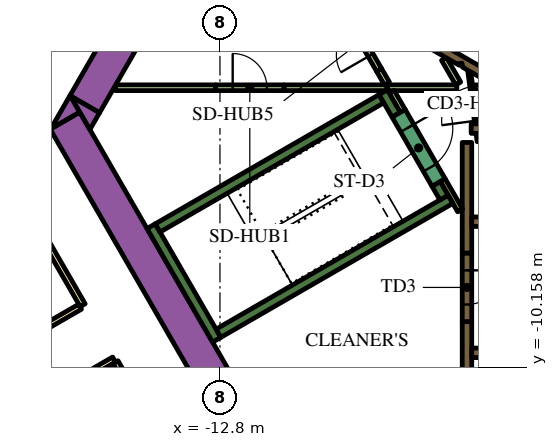
"""IFC4 building model, lengths in metres.
Left out: names, types, materials, properties, quantities, classifications, styles, units other than length and angle.
Written with IfcOpenShell. Run it as: python <this file> out.ifc"""

import sys

from ifc_helpers import new_model, si_unit, direction, frame, frame_2d, origin, place, context, subcontext, project, spatial, polyline, rectangle, outline, extrude, element, fill, save


model = new_model("IFC4")
c1 = context("Model", 3, precision=1e-05, world=origin(), true_north=direction((0.0, 1.0)))
c2 = subcontext(c1, "Body", "Model", "MODEL_VIEW")
j1 = project(units=[si_unit("LENGTHUNIT", "METRE"), si_unit("PLANEANGLEUNIT", "RADIAN")], contexts=[c1])
p1 = place(None, origin())
s1 = spatial("IfcSite", under=j1, at=p1, CompositionType="ELEMENT")
p2 = place(p1, origin())
s2 = spatial("IfcBuilding", under=s1, at=p2, CompositionType="ELEMENT")
p3 = place(p2, frame((0.0, 0.0, 62.7)))
s3 = spatial("IfcBuildingStorey", under=s2, at=p3, CompositionType="ELEMENT", Elevation=62.7)
p4 = place(p3, frame((-12.134, -11.883, 0.0), z_axis=(0.0, 0.0, 1.0), x_axis=(-0.500005339912, 0.866022320763, 0.0)))
e1 = element("IfcWall", 1, at=p4, inside=s3, PredefinedType="SOLIDWALL", context=c2, shape_type="SweptSolid", body=[
    extrude(rectangle(XDim=9.488, YDim=0.9, at=frame_2d((4.744, 0.0))), origin(), (0.0, 0.0, 1.0), 3.9),
])
p5 = place(p3, origin())
e2 = element("IfcWall", 2, at=p5, inside=s3, PredefinedType="SOLIDWALL", context=c2, shape_type="SweptSolid", body=[
    extrude(outline(polyline([(-16.489, -3.44), (-17.251, -3.88), (-16.743, -3.0), (-16.489, -3.44)])), origin(), (0.0, 0.0, 1.0), 3.9),
])
p6 = place(p3, frame((-15.118, -1.085, 0.0), z_axis=(0.0, 0.0, 1.0), x_axis=(-0.50006606081, -0.865987260198, 0.0)))
e3 = element("IfcWall", 3, at=p6, inside=s3, PredefinedType="SOLIDWALL", context=c2, shape_type="SweptSolid", body=[
    extrude(rectangle(XDim=2.481, YDim=0.9, at=frame_2d((1.24, 0.0))), origin(), (0.0, 0.0, 1.0), 3.9),
])
e4 = element("IfcWall", 4, at=p5, inside=s3, PredefinedType="SOLIDWALL", context=c2, shape_type="SweptSolid", body=[
    extrude(outline(polyline([(-16.223, -3.9), (-16.732, -3.02), (-15.969, -3.46), (-16.223, -3.9)])), origin(), (0.0, 0.0, 1.0), 3.9),
])
p7 = place(p3, frame((-12.885, -9.431, 0.0), z_axis=(0.0, 0.0, 1.0), x_axis=(-0.500020560727, 0.866013532718, 0.0)))
e5 = element("IfcWall", 5, at=p7, inside=s3, PredefinedType="SOLIDWALL", context=c2, shape_type="SweptSolid", body=[
    extrude(rectangle(XDim=3.45, YDim=0.25, at=frame_2d((1.725, 0.0))), origin(), (0.0, 0.0, 1.0), 3.9),
])
p8 = place(p3, frame((-14.44, -6.49, 0.0), z_axis=(0.0, 0.0, 1.0), x_axis=(0.866022966069, 0.500004222222, 0.0)))
e6 = element("IfcWall", 6, at=p8, inside=s3, PredefinedType="SOLIDWALL", context=c2, shape_type="SweptSolid", body=[
    extrude(rectangle(XDim=6.8, YDim=0.25, at=frame_2d((3.4, 0.0))), origin(), (0.0, 0.0, 1.0), 3.9),
])
p9 = place(p3, frame((-8.163, -3.511, 0.0), z_axis=(0.0, 0.0, 1.0), x_axis=(-0.500206266495, 0.865906283012, 0.0)))
e7 = element("IfcWall", 7, at=p9, inside=s3, PredefinedType="SOLIDWALL", context=c2, shape_type="SweptSolid", body=[
    extrude(rectangle(XDim=0.684, YDim=0.25, at=frame_2d((0.342, 0.0))), origin(), (0.0, 0.0, 1.0), 3.9),
])
p10 = place(p3, frame((-12.84, -9.261, 0.0), z_axis=(0.0, 0.0, 1.0), x_axis=(0.866016039709, 0.500016218704, 0.0)))
e8 = element("IfcWall", 8, at=p10, inside=s3, PredefinedType="SOLIDWALL", context=c2, shape_type="SweptSolid", body=[
    extrude(rectangle(XDim=7.05, YDim=0.25, at=frame_2d((3.525, 0.0))), origin(), (0.0, 0.0, 1.0), 3.9),
])
p11 = place(p3, frame((-6.905, -5.69, 0.0), z_axis=(0.0, 0.0, 1.0), x_axis=(-0.499993700073, 0.866029041019, 0.0)))
e9 = element("IfcWall", 9, at=p11, inside=s3, PredefinedType="SOLIDWALL", context=c2, shape_type="SweptSolid", body=[
    extrude(rectangle(XDim=0.416, YDim=0.25, at=frame_2d((0.208, 0.0))), origin(), (0.0, 0.0, 1.0), 3.9),
])
p12 = place(p3, frame((-6.3, -12.1, 0.0), z_axis=(0.0, 0.0, 1.0), x_axis=(0.0, 1.0, 0.0)))
e10 = element("IfcWall", 10, at=p12, inside=s3, PredefinedType="SOLIDWALL", context=c2, shape_type="SweptSolid", body=[
    extrude(rectangle(XDim=3.146, YDim=0.25, at=frame_2d((1.573, 0.0))), origin(), (0.0, 0.0, 1.0), 3.9),
])
p13 = place(p3, frame((-6.3, -4.24, 0.0), z_axis=(0.0, 0.0, 1.0), x_axis=(0.0, -1.0, 0.0)))
e11 = element("IfcWall", 11, at=p13, inside=s3, PredefinedType="SOLIDWALL", context=c2, shape_type="SweptSolid", body=[
    extrude(rectangle(XDim=2.914, YDim=0.25, at=frame_2d((1.457, 0.0))), origin(), (0.0, 0.0, 1.0), 3.9),
])
p14 = place(p3, frame((-6.19, -3.875, 0.0), z_axis=(0.0, 0.0, 1.0), x_axis=(1.0, 0.0, 0.0)))
e12 = element("IfcWall", 12, at=p14, inside=s3, PredefinedType="SOLIDWALL", context=c2, shape_type="SweptSolid", body=[
    extrude(rectangle(XDim=12.615, YDim=0.25, at=frame_2d((6.307, 0.0))), origin(), (0.0, 0.0, 1.0), 3.9),
])
e13 = element("IfcWall", 13, at=p5, inside=s3, PredefinedType="SOLIDWALL", context=c2, shape_type="SweptSolid", body=[
    extrude(outline(polyline([(-5.922, -2.257), (-5.922, -2.257), (-5.705, -2.382), (-5.83, -2.598), (-6.418, -2.258), (-6.433, -2.153), (-6.433, -2.153), (-6.433, -2.153), (-6.508, -2.163), (-6.508, -2.163), (-6.508, -2.163), (-6.501, -2.21), (-7.952, -1.373), (-7.827, -1.156), (-5.922, -2.257)])), origin(), (0.0, 0.0, 1.0), 3.9),
])
p15 = place(p3, frame((-6.48, -6.027, 0.0), z_axis=(0.0, 0.0, 1.0), x_axis=(-0.499936960004, 0.866061796884, 0.0)))
e14 = element("IfcWall", 14, at=p15, inside=s3, PredefinedType="PARTITIONING", context=c2, shape_type="SweptSolid", body=[
    extrude(rectangle(XDim=0.919, YDim=0.15, at=frame_2d((0.46, 0.0))), origin(), (0.0, 0.0, 1.0), 3.9),
])
p16 = place(p3, frame((-12.915, -2.8, 0.0), z_axis=(0.0, 0.0, 1.0), x_axis=(-1.0, 0.0, 0.0)))
e15 = element("IfcWall", 15, at=p16, inside=s3, PredefinedType="PARTITIONING", context=c2, shape_type="SweptSolid", body=[
    extrude(rectangle(XDim=2.637, YDim=0.15, at=frame_2d((1.318, 0.0))), origin(), (0.0, 0.0, 1.0), 2.75),
])
p17 = place(p3, frame((-8.395, -2.8, 0.0), z_axis=(0.0, 0.0, 1.0), x_axis=(1.0, 0.0, 0.0)))
e16 = element("IfcWall", 16, at=p17, inside=s3, PredefinedType="PARTITIONING", context=c2, shape_type="SweptSolid", body=[
    extrude(rectangle(XDim=1.828, YDim=0.15, at=frame_2d((0.914, 0.0))), origin(), (0.0, 0.0, 1.0), 2.75),
])
p18 = place(p3, frame((-11.115, -2.8, 0.0), z_axis=(0.0, 0.0, 1.0), x_axis=(1.0, 0.0, 0.0)))
e17 = element("IfcWall", 17, at=p18, inside=s3, PredefinedType="PARTITIONING", context=c2, shape_type="SweptSolid", body=[
    extrude(rectangle(XDim=2.708, YDim=0.15, at=frame_2d((1.354, 0.0))), origin(), (0.0, 0.0, 1.0), 2.75),
])
p19 = place(p3, frame((-6.531, -2.689, 0.0), z_axis=(0.0, 0.0, 1.0), x_axis=(-0.499967446111, 0.866044197965, 0.0)))
e18 = element("IfcWall", 18, at=p19, inside=s3, PredefinedType="PARTITIONING", context=c2, shape_type="SweptSolid", body=[
    extrude(rectangle(XDim=0.748, YDim=0.15, at=frame_2d((0.374, 0.0))), origin(), (0.0, 0.0, 1.0), 2.75),
])
p20 = place(p3, frame((-7.99, -3.412, 0.0), z_axis=(0.0, 0.0, 1.0), x_axis=(-0.500193841991, 0.86591346013, 0.0)))
e19 = element("IfcWall", 19, at=p20, inside=s3, PredefinedType="PARTITIONING", context=c2, shape_type="SweptSolid", body=[
    extrude(rectangle(XDim=0.583, YDim=0.15, at=frame_2d((0.292, 0.0))), origin(), (0.0, 0.0, 1.0), 2.75),
])
p21 = place(p3, frame((-8.612, -2.333, 0.0), z_axis=(0.0, 0.0, 1.0), x_axis=(0.500248216681, -0.86588204838, 0.0)))
e20 = element("IfcWall", 20, at=p21, inside=s3, PredefinedType="PARTITIONING", context=c2, shape_type="SweptSolid", body=[
    extrude(rectangle(XDim=0.415, YDim=0.15, at=frame_2d((0.208, 0.0))), origin(), (0.0, 0.0, 1.0), 2.75),
])
p22 = place(p3, frame((-6.086, -2.801, 0.0), z_axis=(0.0, 0.0, 1.0), x_axis=(1.0, 0.0, 0.0)))
e21 = element("IfcWall", 21, at=p22, inside=s3, PredefinedType="PARTITIONING", context=c2, shape_type="SweptSolid", body=[
    extrude(rectangle(XDim=7.524, YDim=0.15, at=frame_2d((3.762, 0.0))), origin(), (0.0, 0.0, 1.0), 2.75),
])
p23 = place(p3, frame((-6.175, -9.775, 0.0), z_axis=(0.0, 0.0, 1.0), x_axis=(1.0, 0.0, 0.0)))
e22 = element("IfcWall", 22, at=p23, inside=s3, PredefinedType="SOLIDWALL", context=c2, shape_type="SweptSolid", body=[
    extrude(rectangle(XDim=12.35, YDim=0.25, at=frame_2d((6.175, 0.0))), origin(), (0.0, 0.0, 1.0), 3.9),
])
p24 = place(p23, frame((0.585, 0.0, 0.0)))
e23 = element("IfcOpeningElement", 23, at=p24, cuts=e22, PredefinedType="OPENING", context=c2, shape_type="SweptSolid", body=[
    extrude(rectangle(XDim=1.1, YDim=2.1, at=frame_2d((0.55, 1.05))), frame((0.0, 0.135, 0.0), z_axis=(0.0, -1.0, 0.0), x_axis=(1.0, 0.0, 0.0)), (0.0, 0.0, 1.0), 0.27),
])
p25 = place(p23, frame((3.105, 0.0, 0.0)))
e24 = element("IfcOpeningElement", 24, at=p25, cuts=e22, PredefinedType="OPENING", context=c2, shape_type="SweptSolid", body=[
    extrude(rectangle(XDim=1.1, YDim=2.1, at=frame_2d((0.55, 1.05))), frame((0.0, 0.135, 0.0), z_axis=(0.0, -1.0, 0.0), x_axis=(1.0, 0.0, 0.0)), (0.0, 0.0, 1.0), 0.27),
])
p26 = place(p23, frame((5.625, 0.0, 0.0)))
e25 = element("IfcOpeningElement", 25, at=p26, cuts=e22, PredefinedType="OPENING", context=c2, shape_type="SweptSolid", body=[
    extrude(rectangle(XDim=1.1, YDim=2.1, at=frame_2d((0.55, 1.05))), frame((0.0, 0.135, 0.0), z_axis=(0.0, -1.0, 0.0), x_axis=(1.0, 0.0, 0.0)), (0.0, 0.0, 1.0), 0.27),
])
p27 = place(p23, frame((8.145, 0.0, 0.0)))
e26 = element("IfcOpeningElement", 26, at=p27, cuts=e22, PredefinedType="OPENING", context=c2, shape_type="SweptSolid", body=[
    extrude(rectangle(XDim=1.1, YDim=2.1, at=frame_2d((0.55, 1.05))), frame((0.0, 0.135, 0.0), z_axis=(0.0, -1.0, 0.0), x_axis=(1.0, 0.0, 0.0)), (0.0, 0.0, 1.0), 0.27),
])
p28 = place(p23, frame((10.665, 0.0, 0.0)))
e27 = element("IfcOpeningElement", 27, at=p28, cuts=e22, PredefinedType="OPENING", context=c2, shape_type="SweptSolid", body=[
    extrude(rectangle(XDim=1.1, YDim=2.1, at=frame_2d((0.55, 1.05))), frame((0.0, 0.135, 0.0), z_axis=(0.0, -1.0, 0.0), x_axis=(1.0, 0.0, 0.0)), (0.0, 0.0, 1.0), 0.27),
])
p29 = place(p3, frame((-6.175, -6.325, 0.0), z_axis=(0.0, 0.0, 1.0), x_axis=(1.0, 0.0, 0.0)))
e28 = element("IfcWall", 28, at=p29, inside=s3, PredefinedType="SOLIDWALL", context=c2, shape_type="SweptSolid", body=[
    extrude(rectangle(XDim=12.35, YDim=0.25, at=frame_2d((6.175, 0.0))), origin(), (0.0, 0.0, 1.0), 3.9),
])
p30 = place(p29, frame((3.205, 0.0, 0.0)))
e29 = element("IfcOpeningElement", 29, at=p30, cuts=e28, PredefinedType="OPENING", context=c2, shape_type="SweptSolid", body=[
    extrude(rectangle(XDim=0.9, YDim=2.1, at=frame_2d((0.45, 1.05))), frame((0.0, 0.135, 0.0), z_axis=(0.0, -1.0, 0.0), x_axis=(1.0, 0.0, 0.0)), (0.0, 0.0, 1.0), 0.27),
])
p31 = place(p29, frame((8.145, 0.0, 0.0)))
e30 = element("IfcOpeningElement", 30, at=p31, cuts=e28, PredefinedType="OPENING", context=c2, shape_type="SweptSolid", body=[
    extrude(rectangle(XDim=1.1, YDim=2.1, at=frame_2d((0.55, 1.05))), frame((0.0, 0.135, 0.0), z_axis=(0.0, -1.0, 0.0), x_axis=(1.0, 0.0, 0.0)), (0.0, 0.0, 1.0), 0.27),
])
p32 = place(p29, frame((10.665, 0.0, 0.0)))
e31 = element("IfcOpeningElement", 31, at=p32, cuts=e28, PredefinedType="OPENING", context=c2, shape_type="SweptSolid", body=[
    extrude(rectangle(XDim=1.1, YDim=2.1, at=frame_2d((0.55, 1.05))), frame((0.0, 0.135, 0.0), z_axis=(0.0, -1.0, 0.0), x_axis=(1.0, 0.0, 0.0)), (0.0, 0.0, 1.0), 0.27),
])
p33 = place(p3, frame((-8.098, -3.474, 0.0), z_axis=(0.0, 0.0, 1.0), x_axis=(0.49994051562, -0.866059744384, 0.0)))
e32 = element("IfcWall", 32, at=p33, inside=s3, PredefinedType="SOLIDWALL", context=c2, shape_type="SweptSolid", body=[
    extrude(rectangle(XDim=2.1, YDim=0.4, at=frame_2d((1.05, 0.0))), origin(), (0.0, 0.0, 1.0), 3.9),
])
p34 = place(p33, frame((0.45, 0.0, 0.0)))
e33 = element("IfcOpeningElement", 33, at=p34, cuts=e32, PredefinedType="OPENING", context=c2, shape_type="SweptSolid", body=[
    extrude(rectangle(XDim=1.2, YDim=2.1, at=frame_2d((0.6, 1.05))), frame((0.0, 0.21, 0.0), z_axis=(0.0, -1.0, 0.0), x_axis=(1.0, 0.0, 0.0)), (0.0, 0.0, 1.0), 0.42),
])
p35 = place(p3, frame((-6.3, -7.154, 0.0), z_axis=(0.0, 0.0, 1.0), x_axis=(0.0, -1.0, 0.0)))
e34 = element("IfcWall", 34, at=p35, inside=s3, PredefinedType="SOLIDWALL", context=c2, shape_type="SweptSolid", body=[
    extrude(rectangle(XDim=1.8, YDim=0.25, at=frame_2d((0.9, 0.0))), origin(), (0.0, 0.0, 1.0), 3.9),
])
p36 = place(p35, frame((0.45, 0.0, 0.0)))
e35 = element("IfcOpeningElement", 35, at=p36, cuts=e34, PredefinedType="OPENING", context=c2, shape_type="SweptSolid", body=[
    extrude(rectangle(XDim=0.9, YDim=2.1, at=frame_2d((0.45, 1.05))), frame((0.0, 0.135, 0.0), z_axis=(0.0, -1.0, 0.0), x_axis=(1.0, 0.0, 0.0)), (0.0, 0.0, 1.0), 0.27),
])
p37 = place(p3, frame((-5.995, -4.213, 0.0), z_axis=(0.0, 0.0, 1.0), x_axis=(-0.132072335448, 0.991240081014, 0.0)))
e36 = element("IfcWall", 36, at=p37, inside=s3, PredefinedType="PARTITIONING", context=c2, shape_type="SweptSolid", body=[
    extrude(rectangle(XDim=2.1, YDim=0.076, at=frame_2d((1.05, 0.0))), origin(), (0.0, 0.0, 1.0), 2.75),
])
p38 = place(p37, frame((0.55, 0.0, 0.0)))
e37 = element("IfcOpeningElement", 37, at=p38, cuts=e36, PredefinedType="OPENING", context=c2, shape_type="SweptSolid", body=[
    extrude(rectangle(XDim=0.9, YDim=2.1, at=frame_2d((0.45, 1.05))), frame((0.0, 0.048, 0.0), z_axis=(0.0, -1.0, 0.0), x_axis=(1.0, 0.0, 0.0)), (0.0, 0.0, 1.0), 0.096),
])
p39 = place(p3, frame((-12.915, -2.8, 0.0), z_axis=(0.0, 0.0, 1.0), x_axis=(1.0, 0.0, 0.0)))
e38 = element("IfcWall", 38, at=p39, inside=s3, PredefinedType="PARTITIONING", context=c2, shape_type="SweptSolid", body=[
    extrude(rectangle(XDim=1.8, YDim=0.15, at=frame_2d((0.9, 0.0))), origin(), (0.0, 0.0, 1.0), 2.75),
])
p40 = place(p39, frame((0.45, 0.0, 0.0)))
e39 = element("IfcOpeningElement", 39, at=p40, cuts=e38, PredefinedType="OPENING", context=c2, shape_type="SweptSolid", body=[
    extrude(rectangle(XDim=0.9, YDim=2.1, at=frame_2d((0.45, 1.05))), frame((0.0, 0.085, 0.0), z_axis=(0.0, -1.0, 0.0), x_axis=(1.0, 0.0, 0.0)), (0.0, 0.0, 1.0), 0.17),
])
p41 = place(p3, frame((-8.612, -2.333, 0.0), z_axis=(0.0, 0.0, 1.0), x_axis=(-0.499961193289, 0.866047807691, 0.0)))
e40 = element("IfcWall", 40, at=p41, inside=s3, PredefinedType="PARTITIONING", context=c2, shape_type="SweptSolid", body=[
    extrude(rectangle(XDim=1.8, YDim=0.15, at=frame_2d((0.9, 0.0))), origin(), (0.0, 0.0, 1.0), 2.75),
])
p42 = place(p41, frame((0.45, 0.0, 0.0)))
e41 = element("IfcOpeningElement", 41, at=p42, cuts=e40, PredefinedType="OPENING", context=c2, shape_type="SweptSolid", body=[
    extrude(rectangle(XDim=0.9, YDim=2.1, at=frame_2d((0.45, 1.05))), frame((0.0, 0.085, 0.0), z_axis=(0.0, -1.0, 0.0), x_axis=(1.0, 0.0, 0.0)), (0.0, 0.0, 1.0), 0.17),
])
p43 = place(p3, frame((-19.081, -3.9, 0.0), z_axis=(0.0, 0.0, 1.0), x_axis=(0.499998313975, 0.866026377209, 0.0)))
e42 = element("IfcWall", 42, at=p43, inside=s3, PredefinedType="PARTITIONING", context=c2, shape_type="SweptSolid", body=[
    extrude(rectangle(XDim=25.766, YDim=0.15, at=frame_2d((12.883, 0.0))), origin(), (0.0, 0.0, 1.0), 2.75),
])
p44 = place(p43, frame((24.586, 0.0, 0.0)))
e43 = element("IfcOpeningElement", 43, at=p44, cuts=e42, PredefinedType="OPENING", context=c2, shape_type="SweptSolid", body=[
    extrude(rectangle(XDim=1.0, YDim=2.1, at=frame_2d((0.5, 1.05))), frame((0.0, 0.085, 0.0), z_axis=(0.0, -1.0, 0.0), x_axis=(1.0, 0.0, 0.0)), (0.0, 0.0, 1.0), 0.17),
])
p45 = place(p43, frame((9.948, 0.0, 0.0)))
e44 = element("IfcOpeningElement", 44, at=p45, cuts=e42, PredefinedType="OPENING", context=c2, shape_type="SweptSolid", body=[
    extrude(rectangle(XDim=1.0, YDim=2.1, at=frame_2d((0.5, 1.05))), frame((0.0, 0.085, 0.0), z_axis=(0.0, -1.0, 0.0), x_axis=(1.0, 0.0, 0.0)), (0.0, 0.0, 1.0), 0.17),
])
p46 = place(p43, frame((7.782, 0.0, 0.0)))
e45 = element("IfcOpeningElement", 45, at=p46, cuts=e42, PredefinedType="OPENING", context=c2, shape_type="SweptSolid", body=[
    extrude(rectangle(XDim=0.9, YDim=2.1, at=frame_2d((0.45, 1.05))), frame((0.0, 0.085, 0.0), z_axis=(0.0, -1.0, 0.0), x_axis=(1.0, 0.0, 0.0)), (0.0, 0.0, 1.0), 0.17),
])
p47 = place(p43, frame((4.658, 0.0, 0.0)))
e46 = element("IfcOpeningElement", 46, at=p47, cuts=e42, PredefinedType="OPENING", context=c2, shape_type="SweptSolid", body=[
    extrude(rectangle(XDim=0.9, YDim=2.1, at=frame_2d((0.45, 1.05))), frame((0.0, 0.085, 0.0), z_axis=(0.0, -1.0, 0.0), x_axis=(1.0, 0.0, 0.0)), (0.0, 0.0, 1.0), 0.17),
])
p48 = place(p3, frame((-16.412, -8.523, 0.0), z_axis=(0.0, 0.0, 1.0), x_axis=(-0.500001929737, 0.866024289647, 0.0)))
e47 = element("IfcWall", 47, at=p48, inside=s3, PredefinedType="PARTITIONING", context=c2, shape_type="SweptSolid", body=[
    extrude(rectangle(XDim=5.268, YDim=0.15, at=frame_2d((2.634, 0.0))), origin(), (0.0, 0.0, 1.0), 2.75),
])
p49 = place(p48, frame((4.088, 0.0, 0.0)))
e48 = element("IfcOpeningElement", 48, at=p49, cuts=e47, PredefinedType="OPENING", context=c2, shape_type="SweptSolid", body=[
    extrude(rectangle(XDim=1.0, YDim=2.1, at=frame_2d((0.5, 1.05))), frame((0.0, 0.085, 0.0), z_axis=(0.0, -1.0, 0.0), x_axis=(1.0, 0.0, 0.0)), (0.0, 0.0, 1.0), 0.17),
])
p50 = place(p3, frame((-30.463, -16.635, 0.0), z_axis=(0.0, 0.0, 1.0), x_axis=(0.866022394896, 0.500005211512, 0.0)))
e49 = element("IfcWall", 49, at=p50, inside=s3, PredefinedType="PARTITIONING", context=c2, shape_type="SweptSolid", body=[
    extrude(rectangle(XDim=16.144, YDim=0.15, at=frame_2d((8.072, 0.0))), origin(), (0.0, 0.0, 1.0), 2.75),
])
p51 = place(p50, frame((11.004, 0.0, 0.0)))
e50 = element("IfcOpeningElement", 50, at=p51, cuts=e49, PredefinedType="OPENING", context=c2, shape_type="SweptSolid", body=[
    extrude(rectangle(XDim=1.0, YDim=2.1, at=frame_2d((0.5, 1.05))), frame((0.0, 0.085, 0.0), z_axis=(0.0, -1.0, 0.0), x_axis=(1.0, 0.0, 0.0)), (0.0, 0.0, 1.0), 0.17),
])
p52 = place(p3, frame((-15.587, -9.952, 0.0), z_axis=(0.0, 0.0, 1.0), x_axis=(-0.866022197818, -0.500005552856, 0.0)))
e51 = element("IfcWall", 51, at=p52, inside=s3, PredefinedType="PARTITIONING", context=c2, shape_type="SweptSolid", body=[
    extrude(rectangle(XDim=16.224, YDim=0.15, at=frame_2d((8.112, 0.0))), origin(), (0.0, 0.0, 1.0), 2.75),
])
p53 = place(p52, frame((0.527, 0.0, 0.0)))
e52 = element("IfcOpeningElement", 52, at=p53, cuts=e51, PredefinedType="OPENING", context=c2, shape_type="SweptSolid", body=[
    extrude(rectangle(XDim=1.1, YDim=2.1, at=frame_2d((0.55, 1.05))), frame((0.0, 0.085, 0.0), z_axis=(0.0, -1.0, 0.0), x_axis=(1.0, 0.0, 0.0)), (0.0, 0.0, 1.0), 0.17),
])
p54 = place(p3, frame((-12.918, -14.575, 0.0), z_axis=(0.0, 0.0, 1.0), x_axis=(-0.500009150678, 0.866020120573, 0.0)))
e53 = element("IfcWall", 53, at=p54, inside=s3, PredefinedType="PARTITIONING", context=c2, shape_type="SweptSolid", body=[
    extrude(rectangle(XDim=5.258, YDim=0.15, at=frame_2d((2.629, 0.0))), origin(), (0.0, 0.0, 1.0), 2.75),
])
p55 = place(p34, origin())
e54 = element("IfcDoor", 54, at=p55, inside=s3, OperationType="SINGLE_SWING_LEFT", PredefinedType="DOOR", context=c2, shape_type="SweptSolid", body=[
    extrude(rectangle(XDim=1.2, YDim=2.1, at=frame_2d((0.6, 1.05))), frame((0.0, 0.025, 0.0), z_axis=(0.0, -1.0, 0.0), x_axis=(1.0, 0.0, 0.0)), (0.0, 0.0, 1.0), 0.05),
])
fill(e33, e54)
p56 = place(p36, origin())
e55 = element("IfcDoor", 55, at=p56, inside=s3, OperationType="SINGLE_SWING_LEFT", PredefinedType="DOOR", context=c2, shape_type="SweptSolid", body=[
    extrude(rectangle(XDim=0.9, YDim=2.1, at=frame_2d((0.45, 1.05))), frame((0.0, 0.025, 0.0), z_axis=(0.0, -1.0, 0.0), x_axis=(1.0, 0.0, 0.0)), (0.0, 0.0, 1.0), 0.05),
])
fill(e35, e55)
p57 = place(p38, origin())
e56 = element("IfcDoor", 56, at=p57, inside=s3, OperationType="SINGLE_SWING_LEFT", PredefinedType="DOOR", context=c2, shape_type="SweptSolid", body=[
    extrude(rectangle(XDim=0.9, YDim=2.1, at=frame_2d((0.45, 1.05))), frame((0.0, 0.025, 0.0), z_axis=(0.0, -1.0, 0.0), x_axis=(1.0, 0.0, 0.0)), (0.0, 0.0, 1.0), 0.05),
])
fill(e37, e56)
p58 = place(p40, origin())
e57 = element("IfcDoor", 57, at=p58, inside=s3, OperationType="SINGLE_SWING_LEFT", PredefinedType="DOOR", context=c2, shape_type="SweptSolid", body=[
    extrude(rectangle(XDim=0.9, YDim=2.1, at=frame_2d((0.45, 1.05))), frame((0.0, 0.025, 0.0), z_axis=(0.0, -1.0, 0.0), x_axis=(1.0, 0.0, 0.0)), (0.0, 0.0, 1.0), 0.05),
])
fill(e39, e57)
p59 = place(p42, origin())
e58 = element("IfcDoor", 58, at=p59, inside=s3, OperationType="SINGLE_SWING_LEFT", PredefinedType="DOOR", context=c2, shape_type="SweptSolid", body=[
    extrude(rectangle(XDim=0.9, YDim=2.1, at=frame_2d((0.45, 1.05))), frame((0.0, 0.025, 0.0), z_axis=(0.0, -1.0, 0.0), x_axis=(1.0, 0.0, 0.0)), (0.0, 0.0, 1.0), 0.05),
])
fill(e41, e58)
save(model, sys.argv[1])
